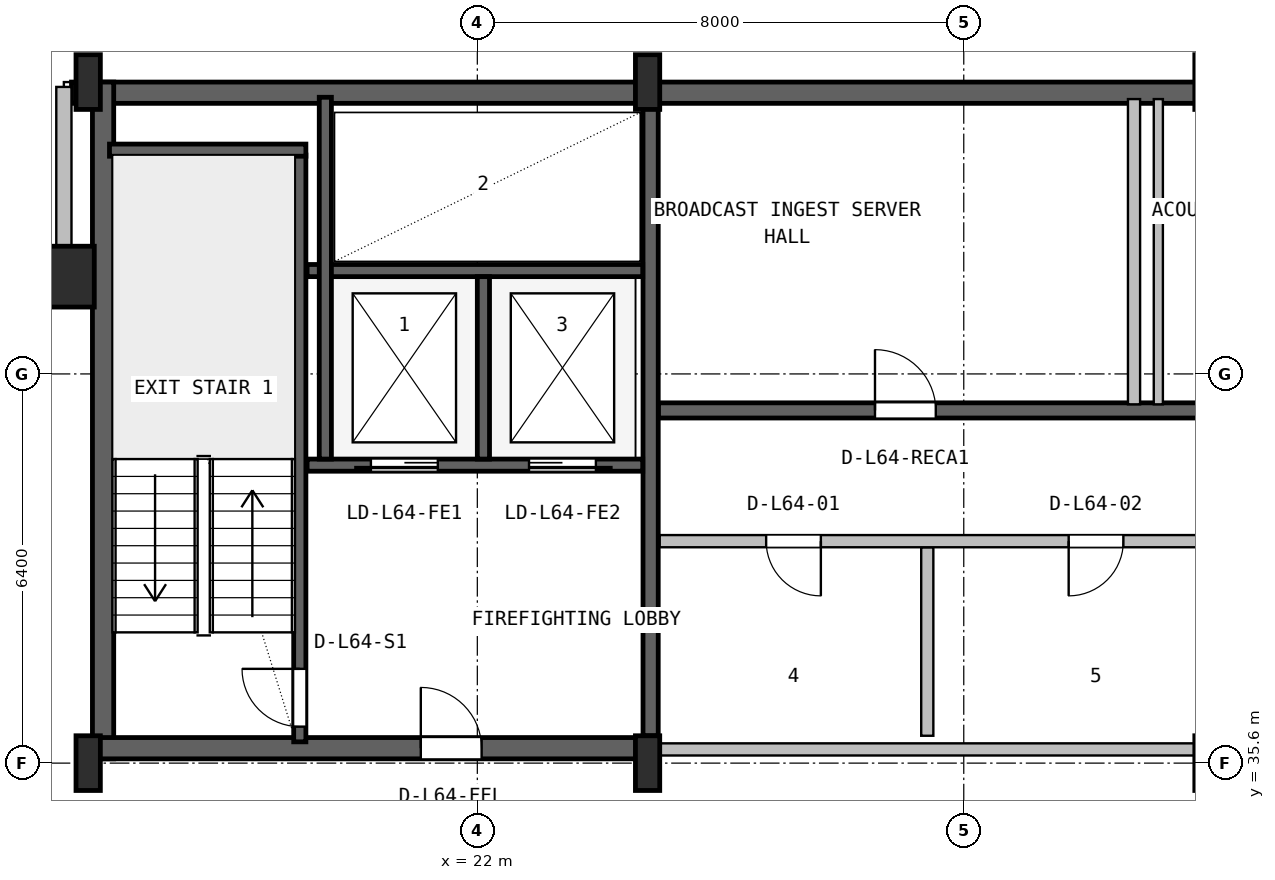
"""IFC4 building model, lengths in metres.
Left out: names, types, materials, properties, quantities, classifications, styles, units other than length and angle.
Written with IfcOpenShell. Run it as: python <this file> out.ifc"""

import sys

from ifc_helpers import new_model, si_unit, direction, frame, frame_2d, origin, origin_2d, place, context, subcontext, project, spatial, rectangle, hollow_rectangle, i_section, extrude, source, transform, mapped, element, fill, save


model = new_model("IFC4")
c1 = context("Model", 3, precision=1e-05, world=origin(), true_north=direction((0.0, 1.0)))
c2 = subcontext(c1, "Body", "Model", "MODEL_VIEW")
j1 = project(units=[si_unit("LENGTHUNIT", "METRE"), si_unit("PLANEANGLEUNIT", "RADIAN")], contexts=[c1])
p1 = place(None, origin())
s1 = spatial("IfcSite", under=j1, at=p1, CompositionType="ELEMENT")
p2 = place(p1, origin())
s2 = spatial("IfcBuilding", under=s1, at=p2, CompositionType="ELEMENT")
p3 = place(p2, frame((0.0, 0.0, 258.4)))
s3 = spatial("IfcBuildingStorey", under=s2, at=p3, CompositionType="ELEMENT", Elevation=258.4)
p4 = place(p3, frame((15.325, 46.625, 0.0), z_axis=(0.0, 0.0, 1.0), x_axis=(1.0, 0.0, 0.0)))
e1 = element("IfcWall", 1, at=p4, inside=s3, PredefinedType="SHEAR", context=c2, shape_type="SweptSolid", body=[
    extrude(rectangle(XDim=37.35, YDim=0.35, at=frame_2d((18.675, 0.0))), origin(), (0.0, 0.0, 1.0), 3.55),
])
p5 = place(p3, frame((15.845, 35.67, 0.0), z_axis=(0.0, 0.0, 1.0), x_axis=(0.0, 1.0, 0.0)))
e2 = element("IfcWall", 2, at=p5, inside=s3, PredefinedType="SHEAR", context=c2, shape_type="SweptSolid", body=[
    extrude(rectangle(XDim=11.13, YDim=0.35, at=frame_2d((5.565, 0.0))), origin(), (0.0, 0.0, 1.0), 3.55),
])
p6 = place(p3, frame((15.67, 35.845, 0.0), z_axis=(0.0, 0.0, 1.0), x_axis=(1.0, 0.0, 0.0)))
e3 = element("IfcWall", 3, at=p6, inside=s3, PredefinedType="SHEAR", context=c2, shape_type="SweptSolid", body=[
    extrude(rectangle(XDim=9.13, YDim=0.35, at=frame_2d((4.565, 0.0))), origin(), (0.0, 0.0, 1.0), 3.55),
])
p7 = place(p6, frame((5.4, 0.0, 0.0)))
e4 = element("IfcOpeningElement", 4, at=p7, cuts=e3, PredefinedType="OPENING", context=c2, shape_type="SweptSolid", body=[
    extrude(rectangle(XDim=1.0, YDim=2.1, at=frame_2d((0.5, 1.05))), frame((0.0, 0.185, 0.0), z_axis=(0.0, -1.0, 0.0), x_axis=(1.0, 0.0, 0.0)), (0.0, 0.0, 1.0), 0.37),
])
m1 = source(origin(), c2, "Body", "SweptSolid", [
    extrude(i_section(OverallWidth=0.4, OverallDepth=0.9, WebThickness=0.016, FlangeThickness=0.028, FilletRadius=0.016, at=origin_2d()), origin(), (0.0, 0.0, 1.0), 3.8),
])
for number, where, z_axis, x_axis in (
    (5, (15.6, 35.6, 0.0), (0.0, 0.0, 1.0), (1.0, 0.0, 0.0)),
    (6, (15.6, 46.8, 0.0), (0.0, 0.0, 1.0), (1.0, 0.0, 0.0)),
    (7, (24.8, 35.6, 0.0), (0.0, 0.0, 1.0), (1.0, 0.0, 0.0)),
    (8, (24.8, 46.8, 0.0), (0.0, 0.0, 1.0), (1.0, 0.0, 0.0)),
):
    element("IfcColumn", number, at=place(p3, frame(where, z_axis=z_axis, x_axis=x_axis)), inside=s3, PredefinedType="COLUMN", context=c2, shape_type="MappedRepresentation", body=[
        mapped(m1, transform((0.0, 0.0, 0.0), x_axis=(1.0, 0.0, 0.0), y_axis=(0.0, 1.0, 0.0), z_axis=(0.0, 0.0, 1.0), scale=1.0)),
    ])
m2 = source(origin(), c2, "Body", "SweptSolid", [
    extrude(hollow_rectangle(XDim=1.0, YDim=1.0, WallThickness=0.04, at=origin_2d()), origin(), (0.0, 0.0, 1.0), 3.8),
])
p8 = place(p3, frame((15.2, 43.6, 0.0), z_axis=(0.0, 0.0, 1.0), x_axis=(1.0, 0.0, 0.0)))
e9 = element("IfcColumn", 9, at=p8, inside=s3, PredefinedType="COLUMN", context=c2, shape_type="MappedRepresentation", body=[
    mapped(m2, transform((0.0, 0.0, 0.0), x_axis=(1.0, 0.0, 0.0), y_axis=(0.0, 1.0, 0.0), z_axis=(0.0, 0.0, 1.0), scale=1.0)),
])
p9 = place(p3, frame((12.08, 43.6, 0.0), z_axis=(0.0, 0.0, 1.0), x_axis=(1.0, 0.0, 0.0)))
e10 = element("IfcWall", 10, at=p9, inside=s3, PredefinedType="SOLIDWALL", context=c2, shape_type="SweptSolid", body=[
    extrude(rectangle(XDim=2.99, YDim=0.25, at=frame_2d((1.495, 0.0))), origin(), (0.0, 0.0, 1.0), 3.53),
])
p10 = place(p3, frame((15.2, 43.52, 0.0), z_axis=(0.0, 0.0, 1.0), x_axis=(0.0, 1.0, 0.0)))
e11 = element("IfcWall", 11, at=p10, inside=s3, PredefinedType="SOLIDWALL", context=c2, shape_type="SweptSolid", body=[
    extrude(rectangle(XDim=3.2, YDim=0.25, at=frame_2d((1.6, 0.0))), origin(), (0.0, 0.0, 1.0), 3.171),
])
p11 = place(p3, frame((19.08, 35.95, 0.0), z_axis=(0.0, 0.0, 1.0), x_axis=(0.0, 1.0, 0.0)))
e12 = element("IfcWall", 12, at=p11, inside=s3, PredefinedType="SHEAR", context=c2, shape_type="SweptSolid", body=[
    extrude(rectangle(XDim=9.65, YDim=0.2, at=frame_2d((4.825, 0.0))), origin(), (0.0, 0.0, 1.0), 3.55),
])
p12 = place(p11, frame((0.25, 0.0, 0.0)))
e13 = element("IfcOpeningElement", 13, at=p12, cuts=e12, PredefinedType="OPENING", context=c2, shape_type="SweptSolid", body=[
    extrude(rectangle(XDim=0.95, YDim=2.1, at=frame_2d((0.475, 1.05))), frame((0.0, 0.11, 0.0), z_axis=(0.0, -1.0, 0.0), x_axis=(1.0, 0.0, 0.0)), (0.0, 0.0, 1.0), 0.22),
])
p13 = place(p3, frame((15.95, 45.68, 0.0), z_axis=(0.0, 0.0, 1.0), x_axis=(1.0, 0.0, 0.0)))
e14 = element("IfcWall", 14, at=p13, inside=s3, PredefinedType="SHEAR", context=c2, shape_type="SweptSolid", body=[
    extrude(rectangle(XDim=3.23, YDim=0.2, at=frame_2d((1.615, 0.0))), origin(), (0.0, 0.0, 1.0), 3.55),
])
p14 = place(p3, frame((24.85, 36.05, 0.0), z_axis=(0.0, 0.0, 1.0), x_axis=(0.0, 1.0, 0.0)))
e15 = element("IfcWall", 15, at=p14, inside=s3, PredefinedType="SHEAR", context=c2, shape_type="SweptSolid", body=[
    extrude(rectangle(XDim=10.45, YDim=0.25, at=frame_2d((5.225, 0.0))), origin(), (0.0, 0.0, 1.0), 3.55),
])
p15 = place(p3, frame((19.2, 40.5, 0.0), z_axis=(0.0, 0.0, 1.0), x_axis=(1.0, 0.0, 0.0)))
e16 = element("IfcWall", 16, at=p15, inside=s3, PredefinedType="SHEAR", context=c2, shape_type="SweptSolid", body=[
    extrude(rectangle(XDim=5.52, YDim=0.2, at=frame_2d((2.76, 0.0))), origin(), (0.0, 0.0, 1.0), 3.55),
])
p16 = place(p15, frame((1.05, 0.0, 0.0)))
e17 = element("IfcOpeningElement", 17, at=p16, cuts=e16, PredefinedType="OPENING", context=c2, shape_type="SweptSolid", body=[
    extrude(rectangle(XDim=1.1, YDim=2.18, at=frame_2d((0.55, 1.09))), frame((0.0, 0.11, 0.0), z_axis=(0.0, -1.0, 0.0), x_axis=(1.0, 0.0, 0.0)), (0.0, 0.0, 1.0), 0.22),
])
p17 = place(p15, frame((3.65, 0.0, 0.0)))
e18 = element("IfcOpeningElement", 18, at=p17, cuts=e16, PredefinedType="OPENING", context=c2, shape_type="SweptSolid", body=[
    extrude(rectangle(XDim=1.1, YDim=2.18, at=frame_2d((0.55, 1.09))), frame((0.0, 0.11, 0.0), z_axis=(0.0, -1.0, 0.0), x_axis=(1.0, 0.0, 0.0)), (0.0, 0.0, 1.0), 0.22),
])
p18 = place(p3, frame((19.2, 43.7, 0.0), z_axis=(0.0, 0.0, 1.0), x_axis=(1.0, 0.0, 0.0)))
e19 = element("IfcWall", 19, at=p18, inside=s3, PredefinedType="SHEAR", context=c2, shape_type="SweptSolid", body=[
    extrude(rectangle(XDim=5.52, YDim=0.2, at=frame_2d((2.76, 0.0))), origin(), (0.0, 0.0, 1.0), 3.55),
])
p19 = place(p3, frame((22.1, 40.6, 0.0), z_axis=(0.0, 0.0, 1.0), x_axis=(0.0, 1.0, 0.0)))
e20 = element("IfcWall", 20, at=p19, inside=s3, PredefinedType="SHEAR", context=c2, shape_type="SweptSolid", body=[
    extrude(rectangle(XDim=3.0, YDim=0.2, at=frame_2d((1.5, 0.0))), origin(), (0.0, 0.0, 1.0), 3.55),
])
p20 = place(p3, frame((19.5, 40.6, 0.0), z_axis=(0.0, 0.0, 1.0), x_axis=(0.0, 1.0, 0.0)))
e21 = element("IfcWall", 21, at=p20, inside=s3, PredefinedType="SHEAR", context=c2, shape_type="SweptSolid", body=[
    extrude(rectangle(XDim=5.95, YDim=0.2, at=frame_2d((2.975, 0.0))), origin(), (0.0, 0.0, 1.0), 3.55),
])
p21 = place(p3, frame((24.98, 41.4, 0.0), z_axis=(0.0, 0.0, 1.0), x_axis=(1.0, 0.0, 0.0)))
e22 = element("IfcWall", 22, at=p21, inside=s3, PredefinedType="SHEAR", context=c2, shape_type="SweptSolid", body=[
    extrude(rectangle(XDim=23.82, YDim=0.25, at=frame_2d((11.91, 0.0))), origin(), (0.0, 0.0, 1.0), 3.55),
])
p22 = place(p21, frame((16.87, 0.0, 0.0)))
e23 = element("IfcOpeningElement", 23, at=p22, cuts=e22, PredefinedType="OPENING", context=c2, shape_type="SweptSolid", body=[
    extrude(rectangle(XDim=1.1, YDim=2.18, at=frame_2d((0.55, 1.09))), frame((0.0, 0.135, 0.0), z_axis=(0.0, -1.0, 0.0), x_axis=(1.0, 0.0, 0.0)), (0.0, 0.0, 1.0), 0.27),
])
p23 = place(p21, frame((19.47, 0.0, 0.0)))
e24 = element("IfcOpeningElement", 24, at=p23, cuts=e22, PredefinedType="OPENING", context=c2, shape_type="SweptSolid", body=[
    extrude(rectangle(XDim=1.1, YDim=2.18, at=frame_2d((0.55, 1.09))), frame((0.0, 0.135, 0.0), z_axis=(0.0, -1.0, 0.0), x_axis=(1.0, 0.0, 0.0)), (0.0, 0.0, 1.0), 0.27),
])
p24 = place(p21, frame((22.07, 0.0, 0.0)))
e25 = element("IfcOpeningElement", 25, at=p24, cuts=e22, PredefinedType="OPENING", context=c2, shape_type="SweptSolid", body=[
    extrude(rectangle(XDim=1.1, YDim=2.18, at=frame_2d((0.55, 1.09))), frame((0.0, 0.135, 0.0), z_axis=(0.0, -1.0, 0.0), x_axis=(1.0, 0.0, 0.0)), (0.0, 0.0, 1.0), 0.27),
])
p25 = place(p21, frame((3.56, 0.0, 0.0)))
e26 = element("IfcOpeningElement", 26, at=p25, cuts=e22, PredefinedType="OPENING", context=c2, shape_type="SweptSolid", body=[
    extrude(rectangle(XDim=1.0, YDim=2.08, at=frame_2d((0.5, 1.04))), frame((0.0, 0.135, 0.0), z_axis=(0.0, -1.0, 0.0), x_axis=(1.0, 0.0, 0.0)), (0.0, 0.0, 1.0), 0.27),
])
p26 = place(p21, frame((9.76, 0.0, 0.0)))
e27 = element("IfcOpeningElement", 27, at=p26, cuts=e22, PredefinedType="OPENING", context=c2, shape_type="SweptSolid", body=[
    extrude(rectangle(XDim=0.92, YDim=2.08, at=frame_2d((0.46, 1.04))), frame((0.0, 0.135, 0.0), z_axis=(0.0, -1.0, 0.0), x_axis=(1.0, 0.0, 0.0)), (0.0, 0.0, 1.0), 0.27),
])
p27 = place(p21, frame((13.66, 0.0, 0.0)))
e28 = element("IfcOpeningElement", 28, at=p27, cuts=e22, PredefinedType="OPENING", context=c2, shape_type="SweptSolid", body=[
    extrude(rectangle(XDim=0.92, YDim=2.08, at=frame_2d((0.46, 1.04))), frame((0.0, 0.135, 0.0), z_axis=(0.0, -1.0, 0.0), x_axis=(1.0, 0.0, 0.0)), (0.0, 0.0, 1.0), 0.27),
])
p28 = place(p3, frame((25.0, 35.825, 0.0), z_axis=(0.0, 0.0, 1.0), x_axis=(1.0, 0.0, 0.0)))
e29 = element("IfcWall", 29, at=p28, inside=s3, PredefinedType="PLUMBINGWALL", context=c2, shape_type="SweptSolid", body=[
    extrude(rectangle(XDim=9.75, YDim=0.2, at=frame_2d((4.875, 0.0))), origin(), (0.0, 0.0, 1.0), 2.575),
])
p29 = place(p3, frame((29.4, 36.05, 0.0), z_axis=(0.0, 0.0, 1.0), x_axis=(0.0, 1.0, 0.0)))
e30 = element("IfcWall", 30, at=p29, inside=s3, PredefinedType="PLUMBINGWALL", context=c2, shape_type="SweptSolid", body=[
    extrude(rectangle(XDim=3.1, YDim=0.2, at=frame_2d((1.55, 0.0))), origin(), (0.0, 0.0, 1.0), 3.53),
])
p30 = place(p3, frame((25.0, 39.25, 0.0), z_axis=(0.0, 0.0, 1.0), x_axis=(1.0, 0.0, 0.0)))
e31 = element("IfcWall", 31, at=p30, inside=s3, PredefinedType="PLUMBINGWALL", context=c2, shape_type="SweptSolid", body=[
    extrude(rectangle(XDim=9.75, YDim=0.2, at=frame_2d((4.875, 0.0))), origin(), (0.0, 0.0, 1.0), 3.53),
])
p31 = place(p30, frame((1.75, 0.0, 0.0)))
e32 = element("IfcOpeningElement", 32, at=p31, cuts=e31, PredefinedType="OPENING", context=c2, shape_type="SweptSolid", body=[
    extrude(rectangle(XDim=0.9, YDim=2.06, at=frame_2d((0.45, 1.03))), frame((0.0, 0.11, 0.0), z_axis=(0.0, -1.0, 0.0), x_axis=(1.0, 0.0, 0.0)), (0.0, 0.0, 1.0), 0.22),
])
p32 = place(p30, frame((6.725, 0.0, 0.0)))
e33 = element("IfcOpeningElement", 33, at=p32, cuts=e31, PredefinedType="OPENING", context=c2, shape_type="SweptSolid", body=[
    extrude(rectangle(XDim=0.9, YDim=2.06, at=frame_2d((0.45, 1.03))), frame((0.0, 0.11, 0.0), z_axis=(0.0, -1.0, 0.0), x_axis=(1.0, 0.0, 0.0)), (0.0, 0.0, 1.0), 0.22),
])
p33 = place(p3, frame((32.8, 41.5, 0.0), z_axis=(0.0, 0.0, 1.0), x_axis=(0.0, 1.0, 0.0)))
e34 = element("IfcWall", 34, at=p33, inside=s3, PredefinedType="SOLIDWALL", context=c2, shape_type="SweptSolid", body=[
    extrude(rectangle(XDim=5.02, YDim=0.2, at=frame_2d((2.51, 0.0))), origin(), (0.0, 0.0, 1.0), 3.53),
])
p34 = place(p3, frame((33.2, 41.5, 0.0), z_axis=(0.0, 0.0, 1.0), x_axis=(0.0, 1.0, 0.0)))
e35 = element("IfcWall", 35, at=p34, inside=s3, PredefinedType="PARTITIONING", context=c2, shape_type="SweptSolid", body=[
    extrude(rectangle(XDim=5.02, YDim=0.15, at=frame_2d((2.51, 0.0))), origin(), (0.0, 0.0, 1.0), 3.53),
])
m3 = source(origin(), c2, "Body", "SweptSolid", [
    extrude(rectangle(XDim=0.95, YDim=2.1, at=frame_2d((0.475, 1.05))), frame((0.0, 0.025, 0.0), z_axis=(0.0, -1.0, 0.0), x_axis=(1.0, 0.0, 0.0)), (0.0, 0.0, 1.0), 0.05),
])
p35 = place(p12, origin())
e36 = element("IfcDoor", 36, at=p35, inside=s3, OperationType="SINGLE_SWING_RIGHT", PredefinedType="DOOR", context=c2, shape_type="MappedRepresentation", body=[
    mapped(m3, transform((0.0, 0.0, 0.0), x_axis=(1.0, 0.0, 0.0), y_axis=(0.0, 1.0, 0.0), z_axis=(0.0, 0.0, 1.0), scale=1.0)),
])
fill(e13, e36)
m4 = source(origin(), c2, "Body", "SweptSolid", [
    extrude(rectangle(XDim=1.0, YDim=2.1, at=frame_2d((0.5, 1.05))), frame((0.0, 0.025, 0.0), z_axis=(0.0, -1.0, 0.0), x_axis=(1.0, 0.0, 0.0)), (0.0, 0.0, 1.0), 0.05),
])
p36 = place(p7, origin())
e37 = element("IfcDoor", 37, at=p36, inside=s3, OperationType="SINGLE_SWING_LEFT", PredefinedType="DOOR", context=c2, shape_type="MappedRepresentation", body=[
    mapped(m4, transform((0.0, 0.0, 0.0), x_axis=(1.0, 0.0, 0.0), y_axis=(0.0, 1.0, 0.0), z_axis=(0.0, 0.0, 1.0), scale=1.0)),
])
fill(e4, e37)
m5 = source(origin(), c2, "Body", "SweptSolid", [
    extrude(rectangle(XDim=1.1, YDim=2.18, at=frame_2d((0.55, 1.09))), frame((0.0, 0.025, 0.0), z_axis=(0.0, -1.0, 0.0), x_axis=(1.0, 0.0, 0.0)), (0.0, 0.0, 1.0), 0.05),
])
p37 = place(p16, frame((1.1, 0.0, 0.0), z_axis=(0.0, 0.0, 1.0), x_axis=(-1.0, 0.0, 0.0)))
e38 = element("IfcDoor", 38, at=p37, inside=s3, OperationType="SLIDING_TO_LEFT", PredefinedType="DOOR", context=c2, shape_type="MappedRepresentation", body=[
    mapped(m5, transform((0.0, 0.0, 0.0), x_axis=(1.0, 0.0, 0.0), y_axis=(0.0, 1.0, 0.0), z_axis=(0.0, 0.0, 1.0), scale=1.0)),
])
fill(e17, e38)
p38 = place(p17, frame((1.1, 0.0, 0.0), z_axis=(0.0, 0.0, 1.0), x_axis=(-1.0, 0.0, 0.0)))
e39 = element("IfcDoor", 39, at=p38, inside=s3, OperationType="SLIDING_TO_RIGHT", PredefinedType="DOOR", context=c2, shape_type="MappedRepresentation", body=[
    mapped(m5, transform((0.0, 0.0, 0.0), x_axis=(1.0, 0.0, 0.0), y_axis=(0.0, 1.0, 0.0), z_axis=(0.0, 0.0, 1.0), scale=1.0)),
])
fill(e18, e39)
m6 = source(origin(), c2, "Body", "SweptSolid", [
    extrude(rectangle(XDim=1.0, YDim=2.08, at=frame_2d((0.5, 1.04))), frame((0.0, 0.025, 0.0), z_axis=(0.0, -1.0, 0.0), x_axis=(1.0, 0.0, 0.0)), (0.0, 0.0, 1.0), 0.05),
])
p39 = place(p25, origin())
e40 = element("IfcDoor", 40, at=p39, inside=s3, OperationType="SINGLE_SWING_LEFT", PredefinedType="DOOR", context=c2, shape_type="MappedRepresentation", body=[
    mapped(m6, transform((0.0, 0.0, 0.0), x_axis=(1.0, 0.0, 0.0), y_axis=(0.0, 1.0, 0.0), z_axis=(0.0, 0.0, 1.0), scale=1.0)),
])
fill(e26, e40)
m7 = source(origin(), c2, "Body", "SweptSolid", [
    extrude(rectangle(XDim=0.9, YDim=2.06, at=frame_2d((0.45, 1.03))), frame((0.0, 0.025, 0.0), z_axis=(0.0, -1.0, 0.0), x_axis=(1.0, 0.0, 0.0)), (0.0, 0.0, 1.0), 0.05),
])
p40 = place(p31, frame((0.9, 0.0, 0.0), z_axis=(0.0, 0.0, 1.0), x_axis=(-1.0, 0.0, 0.0)))
e41 = element("IfcDoor", 41, at=p40, inside=s3, OperationType="SINGLE_SWING_RIGHT", PredefinedType="DOOR", context=c2, shape_type="MappedRepresentation", body=[
    mapped(m7, transform((0.0, 0.0, 0.0), x_axis=(1.0, 0.0, 0.0), y_axis=(0.0, 1.0, 0.0), z_axis=(0.0, 0.0, 1.0), scale=1.0)),
])
fill(e32, e41)
p41 = place(p32, frame((0.9, 0.0, 0.0), z_axis=(0.0, 0.0, 1.0), x_axis=(-1.0, 0.0, 0.0)))
e42 = element("IfcDoor", 42, at=p41, inside=s3, OperationType="SINGLE_SWING_LEFT", PredefinedType="DOOR", context=c2, shape_type="MappedRepresentation", body=[
    mapped(m7, transform((0.0, 0.0, 0.0), x_axis=(1.0, 0.0, 0.0), y_axis=(0.0, 1.0, 0.0), z_axis=(0.0, 0.0, 1.0), scale=1.0)),
])
fill(e33, e42)
save(model, sys.argv[1])
